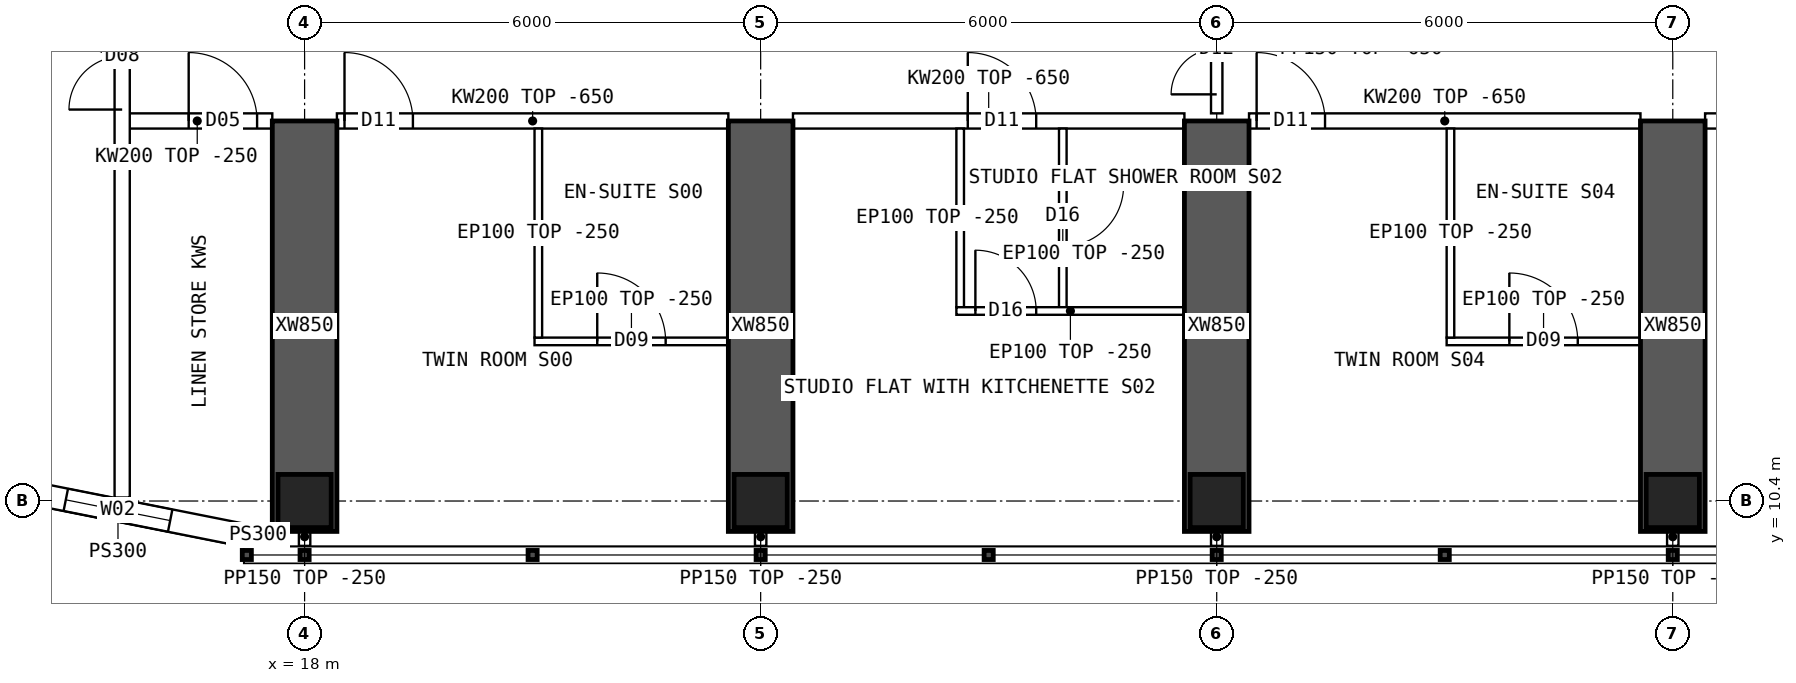
"""IFC4 building model, lengths in metres.
Left out: names, types, materials, properties, quantities, classifications, styles, units other than length and angle.
Written with IfcOpenShell. Run it as: python <this file> out.ifc"""

import sys

from ifc_helpers import new_model, si_unit, direction, frame, frame_2d, origin, origin_2d, place, context, subcontext, project, spatial, polyline, rectangle, hollow_rectangle, outline, extrude, element, fill, save


model = new_model("IFC4")
c1 = context("Model", 3, precision=1e-05, world=origin(), true_north=direction((0.0, 1.0)))
c2 = subcontext(c1, "Body", "Model", "MODEL_VIEW")
j1 = project(units=[si_unit("LENGTHUNIT", "METRE"), si_unit("PLANEANGLEUNIT", "RADIAN")], contexts=[c1])
p1 = place(None, origin())
s1 = spatial("IfcSite", under=j1, at=p1, CompositionType="ELEMENT")
p2 = place(p1, origin())
s2 = spatial("IfcBuilding", under=s1, at=p2, CompositionType="ELEMENT")
p3 = place(p2, frame((0.0, 0.0, 167.35)))
s3 = spatial("IfcBuildingStorey", under=s2, at=p3, CompositionType="ELEMENT", Elevation=167.35)
for number, where, z_axis, x_axis in (
    (1, (18.0, 10.4, 0.0), (0.0, 0.0, 1.0), (1.0, 0.0, 0.0)),
    (2, (24.0, 10.4, 0.0), (0.0, 0.0, 1.0), (1.0, 0.0, 0.0)),
    (3, (30.0, 10.4, 0.0), (0.0, 0.0, 1.0), (1.0, 0.0, 0.0)),
    (4, (36.0, 10.4, 0.0), (0.0, 0.0, 1.0), (1.0, 0.0, 0.0)),
):
    element("IfcColumn", number, at=place(p3, frame(where, z_axis=z_axis, x_axis=x_axis)), inside=s3, PredefinedType="COLUMN", context=c2, shape_type="SweptSolid", body=[
        extrude(hollow_rectangle(XDim=0.7, YDim=0.7, WallThickness=0.07, at=origin_2d()), origin(), (0.0, 0.0, 1.0), 3.75),
    ])
for number, where, z_axis, x_axis in (
    (5, (18.0, 10.0, 0.0), (0.0, 0.0, 1.0), (0.0, 1.0, 0.0)),
    (6, (24.0, 10.0, 0.0), (0.0, 0.0, 1.0), (0.0, 1.0, 0.0)),
    (7, (30.0, 10.0, 0.0), (0.0, 0.0, 1.0), (0.0, 1.0, 0.0)),
    (8, (36.0, 10.0, 0.0), (0.0, 0.0, 1.0), (0.0, 1.0, 0.0)),
):
    element("IfcWall", number, at=place(p3, frame(where, z_axis=z_axis, x_axis=x_axis)), inside=s3, PredefinedType="SHEAR", context=c2, shape_type="SweptSolid", body=[
        extrude(rectangle(XDim=5.4, YDim=0.85, at=frame_2d((2.7, 0.0))), origin(), (0.0, 0.0, 1.0), 3.75),
    ])
p4 = place(p3, frame((13.89, 10.608, 0.0), z_axis=(0.0, 0.0, 1.0), x_axis=(0.98078325777, -0.195100490205, 0.0)))
e9 = element("IfcWall", 9, at=p4, inside=s3, PredefinedType="SOLIDWALL", context=c2, shape_type="SweptSolid", body=[
    extrude(outline(polyline([(-0.03, -0.15), (3.405, -0.15), (3.345, 0.15), (0.03, 0.15), (-0.03, -0.15)])), origin(), (0.0, 0.0, 1.0), 3.5),
])
p5 = place(p4, frame((0.988, 0.0, 0.9)))
e10 = element("IfcOpeningElement", 10, at=p5, cuts=e9, PredefinedType="OPENING", context=c2, shape_type="SweptSolid", body=[
    extrude(rectangle(XDim=1.4, YDim=1.8, at=frame_2d((0.7, 0.9))), frame((0.0, 0.16, 0.0), z_axis=(0.0, -1.0, 0.0), x_axis=(1.0, 0.0, 0.0)), (0.0, 0.0, 1.0), 0.32),
])
p6 = place(p3, frame((17.2, 9.95, 0.0), z_axis=(0.0, 0.0, 1.0), x_axis=(1.0, 0.0, 0.0)))
e11 = element("IfcWall", 11, at=p6, inside=s3, PredefinedType="SOLIDWALL", context=c2, shape_type="SweptSolid", body=[
    extrude(rectangle(XDim=0.375, YDim=0.3, at=frame_2d((0.188, 0.0))), origin(), (0.0, 0.0, 1.0), 3.5),
])
p7 = place(p3, frame((15.6, 15.4, 0.0), z_axis=(0.0, 0.0, 1.0), x_axis=(1.0, 0.0, 0.0)))
e12 = element("IfcWall", 12, at=p7, inside=s3, PredefinedType="SOLIDWALL", context=c2, shape_type="SweptSolid", body=[
    extrude(rectangle(XDim=1.975, YDim=0.2, at=frame_2d((0.987, 0.0))), origin(), (0.0, 0.0, 1.0), 3.5),
])
p8 = place(p7, frame((0.875, 0.0, 0.0)))
e13 = element("IfcOpeningElement", 13, at=p8, cuts=e12, PredefinedType="OPENING", context=c2, shape_type="SweptSolid", body=[
    extrude(rectangle(XDim=0.9, YDim=2.1, at=frame_2d((0.45, 1.05))), frame((0.0, 0.11, 0.0), z_axis=(0.0, -1.0, 0.0), x_axis=(1.0, 0.0, 0.0)), (0.0, 0.0, 1.0), 0.22),
])
p9 = place(p3, frame((18.425, 15.4, 0.0), z_axis=(0.0, 0.0, 1.0), x_axis=(1.0, 0.0, 0.0)))
e14 = element("IfcWall", 14, at=p9, inside=s3, PredefinedType="SOLIDWALL", context=c2, shape_type="SweptSolid", body=[
    extrude(outline(polyline([(0.0, 0.0), (5.15, 0.0), (5.15, 3.1), (0.0, 3.1), (0.0, 0.0)])), frame((0.0, 0.1, 0.0), z_axis=(0.0, -1.0, 0.0), x_axis=(1.0, 0.0, 0.0)), (0.0, 0.0, 1.0), 0.2),
])
p10 = place(p9, frame((0.1, 0.0, 0.0)))
e15 = element("IfcOpeningElement", 15, at=p10, cuts=e14, PredefinedType="OPENING", context=c2, shape_type="SweptSolid", body=[
    extrude(rectangle(XDim=0.9, YDim=2.1, at=frame_2d((0.45, 1.05))), frame((0.0, 0.11, 0.0), z_axis=(0.0, -1.0, 0.0), x_axis=(1.0, 0.0, 0.0)), (0.0, 0.0, 1.0), 0.22),
])
p11 = place(p3, frame((24.425, 15.4, 0.0), z_axis=(0.0, 0.0, 1.0), x_axis=(1.0, 0.0, 0.0)))
e16 = element("IfcWall", 16, at=p11, inside=s3, PredefinedType="SOLIDWALL", context=c2, shape_type="SweptSolid", body=[
    extrude(outline(polyline([(0.0, 0.0), (5.15, 0.0), (5.15, 3.1), (0.0, 3.1), (0.0, 0.0)])), frame((0.0, 0.1, 0.0), z_axis=(0.0, -1.0, 0.0), x_axis=(1.0, 0.0, 0.0)), (0.0, 0.0, 1.0), 0.2),
])
p12 = place(p11, frame((2.3, 0.0, 0.0)))
e17 = element("IfcOpeningElement", 17, at=p12, cuts=e16, PredefinedType="OPENING", context=c2, shape_type="SweptSolid", body=[
    extrude(rectangle(XDim=0.9, YDim=2.1, at=frame_2d((0.45, 1.05))), frame((0.0, 0.11, 0.0), z_axis=(0.0, -1.0, 0.0), x_axis=(1.0, 0.0, 0.0)), (0.0, 0.0, 1.0), 0.22),
])
p13 = place(p3, frame((30.425, 15.4, 0.0), z_axis=(0.0, 0.0, 1.0), x_axis=(1.0, 0.0, 0.0)))
e18 = element("IfcWall", 18, at=p13, inside=s3, PredefinedType="SOLIDWALL", context=c2, shape_type="SweptSolid", body=[
    extrude(outline(polyline([(0.0, 0.0), (5.15, 0.0), (5.15, 3.1), (0.0, 3.1), (0.0, 0.0)])), frame((0.0, 0.1, 0.0), z_axis=(0.0, -1.0, 0.0), x_axis=(1.0, 0.0, 0.0)), (0.0, 0.0, 1.0), 0.2),
])
p14 = place(p13, frame((0.1, 0.0, 0.0)))
e19 = element("IfcOpeningElement", 19, at=p14, cuts=e18, PredefinedType="OPENING", context=c2, shape_type="SweptSolid", body=[
    extrude(rectangle(XDim=0.9, YDim=2.1, at=frame_2d((0.45, 1.05))), frame((0.0, 0.11, 0.0), z_axis=(0.0, -1.0, 0.0), x_axis=(1.0, 0.0, 0.0)), (0.0, 0.0, 1.0), 0.22),
])
p15 = place(p3, frame((36.425, 15.4, 0.0), z_axis=(0.0, 0.0, 1.0), x_axis=(1.0, 0.0, 0.0)))
e20 = element("IfcWall", 20, at=p15, inside=s3, PredefinedType="SOLIDWALL", context=c2, shape_type="SweptSolid", body=[
    extrude(outline(polyline([(0.0, 0.0), (5.15, 0.0), (5.15, 3.1), (0.0, 3.1), (0.0, 0.0)])), frame((0.0, 0.1, 0.0), z_axis=(0.0, -1.0, 0.0), x_axis=(1.0, 0.0, 0.0)), (0.0, 0.0, 1.0), 0.2),
])
p16 = place(p15, frame((0.3, 0.0, 0.0)))
e21 = element("IfcOpeningElement", 21, at=p16, cuts=e20, PredefinedType="OPENING", context=c2, shape_type="SweptSolid", body=[
    extrude(rectangle(XDim=1.0, YDim=2.1, at=frame_2d((0.5, 1.05))), frame((0.0, 0.11, 0.0), z_axis=(0.0, -1.0, 0.0), x_axis=(1.0, 0.0, 0.0)), (0.0, 0.0, 1.0), 0.22),
])
p17 = place(p3, frame((23.575, 12.5, 0.0), z_axis=(0.0, 0.0, 1.0), x_axis=(-1.0, 0.0, 0.0)))
e22 = element("IfcWall", 22, at=p17, inside=s3, PredefinedType="PARTITIONING", context=c2, shape_type="SweptSolid", body=[
    extrude(rectangle(XDim=2.55, YDim=0.1, at=frame_2d((1.275, 0.0))), origin(), (0.0, 0.0, 1.0), 3.5),
])
p18 = place(p17, frame((0.825, 0.0, 0.0)))
e23 = element("IfcOpeningElement", 23, at=p18, cuts=e22, PredefinedType="OPENING", context=c2, shape_type="SweptSolid", body=[
    extrude(rectangle(XDim=0.9, YDim=2.1, at=frame_2d((0.45, 1.05))), frame((0.0, 0.06, 0.0), z_axis=(0.0, -1.0, 0.0), x_axis=(1.0, 0.0, 0.0)), (0.0, 0.0, 1.0), 0.12),
])
p19 = place(p3, frame((21.075, 12.55, 0.0), z_axis=(0.0, 0.0, 1.0), x_axis=(0.0, 1.0, 0.0)))
e24 = element("IfcWall", 24, at=p19, inside=s3, PredefinedType="PARTITIONING", context=c2, shape_type="SweptSolid", body=[
    extrude(outline(polyline([(0.0, 0.0), (2.75, 0.0), (2.75, 3.1), (2.702, 3.1), (2.7, 3.5), (0.0, 3.5), (0.0, 0.0)])), frame((0.0, 0.05, 0.0), z_axis=(0.0, -1.0, 0.0), x_axis=(1.0, 0.0, 0.0)), (0.0, 0.0, 1.0), 0.1),
])
p20 = place(p3, frame((29.575, 12.9, 0.0), z_axis=(0.0, 0.0, 1.0), x_axis=(-1.0, 0.0, 0.0)))
e25 = element("IfcWall", 25, at=p20, inside=s3, PredefinedType="PARTITIONING", context=c2, shape_type="SweptSolid", body=[
    extrude(rectangle(XDim=3.0, YDim=0.1, at=frame_2d((1.5, 0.0))), origin(), (0.0, 0.0, 1.0), 3.5),
])
p21 = place(p20, frame((1.95, 0.0, 0.0)))
e26 = element("IfcOpeningElement", 26, at=p21, cuts=e25, PredefinedType="OPENING", context=c2, shape_type="SweptSolid", body=[
    extrude(rectangle(XDim=0.8, YDim=2.1, at=frame_2d((0.4, 1.05))), frame((0.0, 0.06, 0.0), z_axis=(0.0, -1.0, 0.0), x_axis=(1.0, 0.0, 0.0)), (0.0, 0.0, 1.0), 0.12),
])
p22 = place(p3, frame((26.625, 12.95, 0.0), z_axis=(0.0, 0.0, 1.0), x_axis=(0.0, 1.0, 0.0)))
e27 = element("IfcWall", 27, at=p22, inside=s3, PredefinedType="PARTITIONING", context=c2, shape_type="SweptSolid", body=[
    extrude(outline(polyline([(0.0, 0.0), (2.35, 0.0), (2.35, 3.1), (2.302, 3.1), (2.3, 3.5), (0.0, 3.5), (0.0, 0.0)])), frame((0.0, 0.05, 0.0), z_axis=(0.0, -1.0, 0.0), x_axis=(1.0, 0.0, 0.0)), (0.0, 0.0, 1.0), 0.1),
])
p23 = place(p3, frame((27.975, 12.95, 0.0), z_axis=(0.0, 0.0, 1.0), x_axis=(0.0, 1.0, 0.0)))
e28 = element("IfcWall", 28, at=p23, inside=s3, PredefinedType="PARTITIONING", context=c2, shape_type="SweptSolid", body=[
    extrude(outline(polyline([(0.0, 0.0), (2.35, 0.0), (2.35, 3.1), (2.302, 3.1), (2.3, 3.5), (0.0, 3.5), (0.0, 0.0)])), frame((0.0, 0.05, 0.0), z_axis=(0.0, -1.0, 0.0), x_axis=(1.0, 0.0, 0.0)), (0.0, 0.0, 1.0), 0.1),
])
p24 = place(p23, frame((0.8, 0.0, 0.0)))
e29 = element("IfcOpeningElement", 29, at=p24, cuts=e28, PredefinedType="OPENING", context=c2, shape_type="SweptSolid", body=[
    extrude(rectangle(XDim=0.8, YDim=2.1, at=frame_2d((0.4, 1.05))), frame((0.0, 0.06, 0.0), z_axis=(0.0, -1.0, 0.0), x_axis=(1.0, 0.0, 0.0)), (0.0, 0.0, 1.0), 0.12),
])
p25 = place(p3, frame((35.575, 12.5, 0.0), z_axis=(0.0, 0.0, 1.0), x_axis=(-1.0, 0.0, 0.0)))
e30 = element("IfcWall", 30, at=p25, inside=s3, PredefinedType="PARTITIONING", context=c2, shape_type="SweptSolid", body=[
    extrude(rectangle(XDim=2.55, YDim=0.1, at=frame_2d((1.275, 0.0))), origin(), (0.0, 0.0, 1.0), 3.5),
])
p26 = place(p25, frame((0.825, 0.0, 0.0)))
e31 = element("IfcOpeningElement", 31, at=p26, cuts=e30, PredefinedType="OPENING", context=c2, shape_type="SweptSolid", body=[
    extrude(rectangle(XDim=0.9, YDim=2.1, at=frame_2d((0.45, 1.05))), frame((0.0, 0.06, 0.0), z_axis=(0.0, -1.0, 0.0), x_axis=(1.0, 0.0, 0.0)), (0.0, 0.0, 1.0), 0.12),
])
p27 = place(p3, frame((33.075, 12.55, 0.0), z_axis=(0.0, 0.0, 1.0), x_axis=(0.0, 1.0, 0.0)))
e32 = element("IfcWall", 32, at=p27, inside=s3, PredefinedType="PARTITIONING", context=c2, shape_type="SweptSolid", body=[
    extrude(outline(polyline([(0.0, 0.0), (2.75, 0.0), (2.75, 3.1), (2.702, 3.1), (2.7, 3.5), (0.0, 3.5), (0.0, 0.0)])), frame((0.0, 0.05, 0.0), z_axis=(0.0, -1.0, 0.0), x_axis=(1.0, 0.0, 0.0)), (0.0, 0.0, 1.0), 0.1),
])
p28 = place(p3, frame((30.0, 15.5, 0.0), z_axis=(0.0, 0.0, 1.0), x_axis=(0.0, 1.0, 0.0)))
e33 = element("IfcWall", 33, at=p28, inside=s3, PredefinedType="PARTITIONING", context=c2, shape_type="SweptSolid", body=[
    extrude(outline(polyline([(0.0, 0.0), (1.7, 0.0), (1.7, 3.1), (0.0, 3.1), (0.0, 0.0)])), frame((0.0, 0.075, 0.0), z_axis=(0.0, -1.0, 0.0), x_axis=(1.0, 0.0, 0.0)), (0.0, 0.0, 1.0), 0.15),
])
p29 = place(p28, frame((0.25, 0.0, 0.0)))
e34 = element("IfcOpeningElement", 34, at=p29, cuts=e33, PredefinedType="OPENING", context=c2, shape_type="SweptSolid", body=[
    extrude(rectangle(XDim=1.2, YDim=2.1, at=frame_2d((0.6, 1.05))), frame((0.0, 0.085, 0.0), z_axis=(0.0, -1.0, 0.0), x_axis=(1.0, 0.0, 0.0)), (0.0, 0.0, 1.0), 0.17),
])
p30 = place(p3, frame((15.6, 10.446, 0.0), z_axis=(0.0, 0.0, 1.0), x_axis=(0.0, 1.0, 0.0)))
e35 = element("IfcWall", 35, at=p30, inside=s3, PredefinedType="SOLIDWALL", context=c2, shape_type="SweptSolid", body=[
    extrude(rectangle(XDim=43.107, YDim=0.2, at=frame_2d((21.554, 0.0))), origin(), (0.0, 0.0, 1.0), 3.5),
])
p31 = place(p30, frame((13.914, 0.0, 0.0)))
e36 = element("IfcOpeningElement", 36, at=p31, cuts=e35, PredefinedType="OPENING", context=c2, shape_type="SweptSolid", body=[
    extrude(rectangle(XDim=1.2, YDim=2.1, at=frame_2d((0.6, 1.05))), frame((0.0, 0.11, 0.0), z_axis=(0.0, -1.0, 0.0), x_axis=(1.0, 0.0, 0.0)), (0.0, 0.0, 1.0), 0.22),
])
p32 = place(p30, frame((5.104, 0.0, 0.0)))
e37 = element("IfcOpeningElement", 37, at=p32, cuts=e35, PredefinedType="OPENING", context=c2, shape_type="SweptSolid", body=[
    extrude(rectangle(XDim=1.4, YDim=2.1, at=frame_2d((0.7, 1.05))), frame((0.0, 0.11, 0.0), z_axis=(0.0, -1.0, 0.0), x_axis=(1.0, 0.0, 0.0)), (0.0, 0.0, 1.0), 0.22),
])
p33 = place(p30, frame((36.504, 0.0, 0.0)))
e38 = element("IfcOpeningElement", 38, at=p33, cuts=e35, PredefinedType="OPENING", context=c2, shape_type="SweptSolid", body=[
    extrude(rectangle(XDim=1.4, YDim=2.1, at=frame_2d((0.7, 1.05))), frame((0.0, 0.11, 0.0), z_axis=(0.0, -1.0, 0.0), x_axis=(1.0, 0.0, 0.0)), (0.0, 0.0, 1.0), 0.22),
])
for number, where, z_axis, x_axis in (
    (39, (18.0, 10.05, 0.0), (0.0, 0.0, 1.0), (0.0, -1.0, 0.0)),
    (40, (24.0, 10.05, 0.0), (0.0, 0.0, 1.0), (0.0, -1.0, 0.0)),
    (41, (30.0, 10.05, 0.0), (0.0, 0.0, 1.0), (0.0, -1.0, 0.0)),
    (42, (36.0, 10.05, 0.0), (0.0, 0.0, 1.0), (0.0, -1.0, 0.0)),
):
    element("IfcWall", number, at=place(p3, frame(where, z_axis=z_axis, x_axis=x_axis)), inside=s3, PredefinedType="PARTITIONING", context=c2, shape_type="SweptSolid", body=[
        extrude(rectangle(XDim=0.24, YDim=0.15, at=frame_2d((0.12, 0.0))), origin(), (0.0, 0.0, 1.0), 3.5),
    ])
p34 = place(p5, origin())
e43 = element("IfcWindow", 43, at=p34, inside=s3, PartitioningType="SINGLE_PANEL", PredefinedType="WINDOW", context=c2, shape_type="SweptSolid", body=[
    extrude(rectangle(XDim=1.4, YDim=1.8, at=frame_2d((0.7, 0.9))), frame((0.0, 0.03, 0.0), z_axis=(0.0, -1.0, 0.0), x_axis=(1.0, 0.0, 0.0)), (0.0, 0.0, 1.0), 0.06),
])
fill(e10, e43)
p35 = place(p18, origin())
e44 = element("IfcDoor", 44, at=p35, inside=s3, OperationType="SINGLE_SWING_RIGHT", PredefinedType="DOOR", context=c2, shape_type="SweptSolid", body=[
    extrude(rectangle(XDim=0.9, YDim=2.1, at=frame_2d((0.45, 1.05))), frame((0.0, 0.025, 0.0), z_axis=(0.0, -1.0, 0.0), x_axis=(1.0, 0.0, 0.0)), (0.0, 0.0, 1.0), 0.05),
])
fill(e23, e44)
p36 = place(p10, origin())
e45 = element("IfcDoor", 45, at=p36, inside=s3, OperationType="SINGLE_SWING_LEFT", PredefinedType="DOOR", context=c2, shape_type="SweptSolid", body=[
    extrude(rectangle(XDim=0.9, YDim=2.1, at=frame_2d((0.45, 1.05))), frame((0.0, 0.025, 0.0), z_axis=(0.0, -1.0, 0.0), x_axis=(1.0, 0.0, 0.0)), (0.0, 0.0, 1.0), 0.05),
])
fill(e15, e45)
p37 = place(p21, origin())
e46 = element("IfcDoor", 46, at=p37, inside=s3, OperationType="SINGLE_SWING_RIGHT", PredefinedType="DOOR", context=c2, shape_type="SweptSolid", body=[
    extrude(rectangle(XDim=0.8, YDim=2.1, at=frame_2d((0.4, 1.05))), frame((0.0, 0.025, 0.0), z_axis=(0.0, -1.0, 0.0), x_axis=(1.0, 0.0, 0.0)), (0.0, 0.0, 1.0), 0.05),
])
fill(e26, e46)
p38 = place(p24, origin())
e47 = element("IfcDoor", 47, at=p38, inside=s3, OperationType="SINGLE_SWING_RIGHT", PredefinedType="DOOR", context=c2, shape_type="SweptSolid", body=[
    extrude(rectangle(XDim=0.8, YDim=2.1, at=frame_2d((0.4, 1.05))), frame((0.0, 0.025, 0.0), z_axis=(0.0, -1.0, 0.0), x_axis=(1.0, 0.0, 0.0)), (0.0, 0.0, 1.0), 0.05),
])
fill(e29, e47)
p39 = place(p12, origin())
e48 = element("IfcDoor", 48, at=p39, inside=s3, OperationType="SINGLE_SWING_LEFT", PredefinedType="DOOR", context=c2, shape_type="SweptSolid", body=[
    extrude(rectangle(XDim=0.9, YDim=2.1, at=frame_2d((0.45, 1.05))), frame((0.0, 0.025, 0.0), z_axis=(0.0, -1.0, 0.0), x_axis=(1.0, 0.0, 0.0)), (0.0, 0.0, 1.0), 0.05),
])
fill(e17, e48)
p40 = place(p26, origin())
e49 = element("IfcDoor", 49, at=p40, inside=s3, OperationType="SINGLE_SWING_RIGHT", PredefinedType="DOOR", context=c2, shape_type="SweptSolid", body=[
    extrude(rectangle(XDim=0.9, YDim=2.1, at=frame_2d((0.45, 1.05))), frame((0.0, 0.025, 0.0), z_axis=(0.0, -1.0, 0.0), x_axis=(1.0, 0.0, 0.0)), (0.0, 0.0, 1.0), 0.05),
])
fill(e31, e49)
p41 = place(p14, origin())
e50 = element("IfcDoor", 50, at=p41, inside=s3, OperationType="SINGLE_SWING_LEFT", PredefinedType="DOOR", context=c2, shape_type="SweptSolid", body=[
    extrude(rectangle(XDim=0.9, YDim=2.1, at=frame_2d((0.45, 1.05))), frame((0.0, 0.025, 0.0), z_axis=(0.0, -1.0, 0.0), x_axis=(1.0, 0.0, 0.0)), (0.0, 0.0, 1.0), 0.05),
])
fill(e19, e50)
p42 = place(p29, origin())
e51 = element("IfcDoor", 51, at=p42, inside=s3, OperationType="DOUBLE_DOOR_SINGLE_SWING", PredefinedType="DOOR", context=c2, shape_type="SweptSolid", body=[
    extrude(rectangle(XDim=1.2, YDim=2.1, at=frame_2d((0.6, 1.05))), frame((0.0, 0.025, 0.0), z_axis=(0.0, -1.0, 0.0), x_axis=(1.0, 0.0, 0.0)), (0.0, 0.0, 1.0), 0.05),
])
fill(e34, e51)
p43 = place(p32, origin())
e52 = element("IfcDoor", 52, at=p43, inside=s3, OperationType="DOUBLE_DOOR_SINGLE_SWING", PredefinedType="DOOR", context=c2, shape_type="SweptSolid", body=[
    extrude(rectangle(XDim=1.4, YDim=2.1, at=frame_2d((0.7, 1.05))), frame((0.0, 0.025, 0.0), z_axis=(0.0, -1.0, 0.0), x_axis=(1.0, 0.0, 0.0)), (0.0, 0.0, 1.0), 0.05),
])
fill(e37, e52)
p44 = place(p8, origin())
e53 = element("IfcDoor", 53, at=p44, inside=s3, OperationType="SINGLE_SWING_LEFT", PredefinedType="DOOR", context=c2, shape_type="SweptSolid", body=[
    extrude(rectangle(XDim=0.9, YDim=2.1, at=frame_2d((0.45, 1.05))), frame((0.0, 0.025, 0.0), z_axis=(0.0, -1.0, 0.0), x_axis=(1.0, 0.0, 0.0)), (0.0, 0.0, 1.0), 0.05),
])
fill(e13, e53)
save(model, sys.argv[1])
